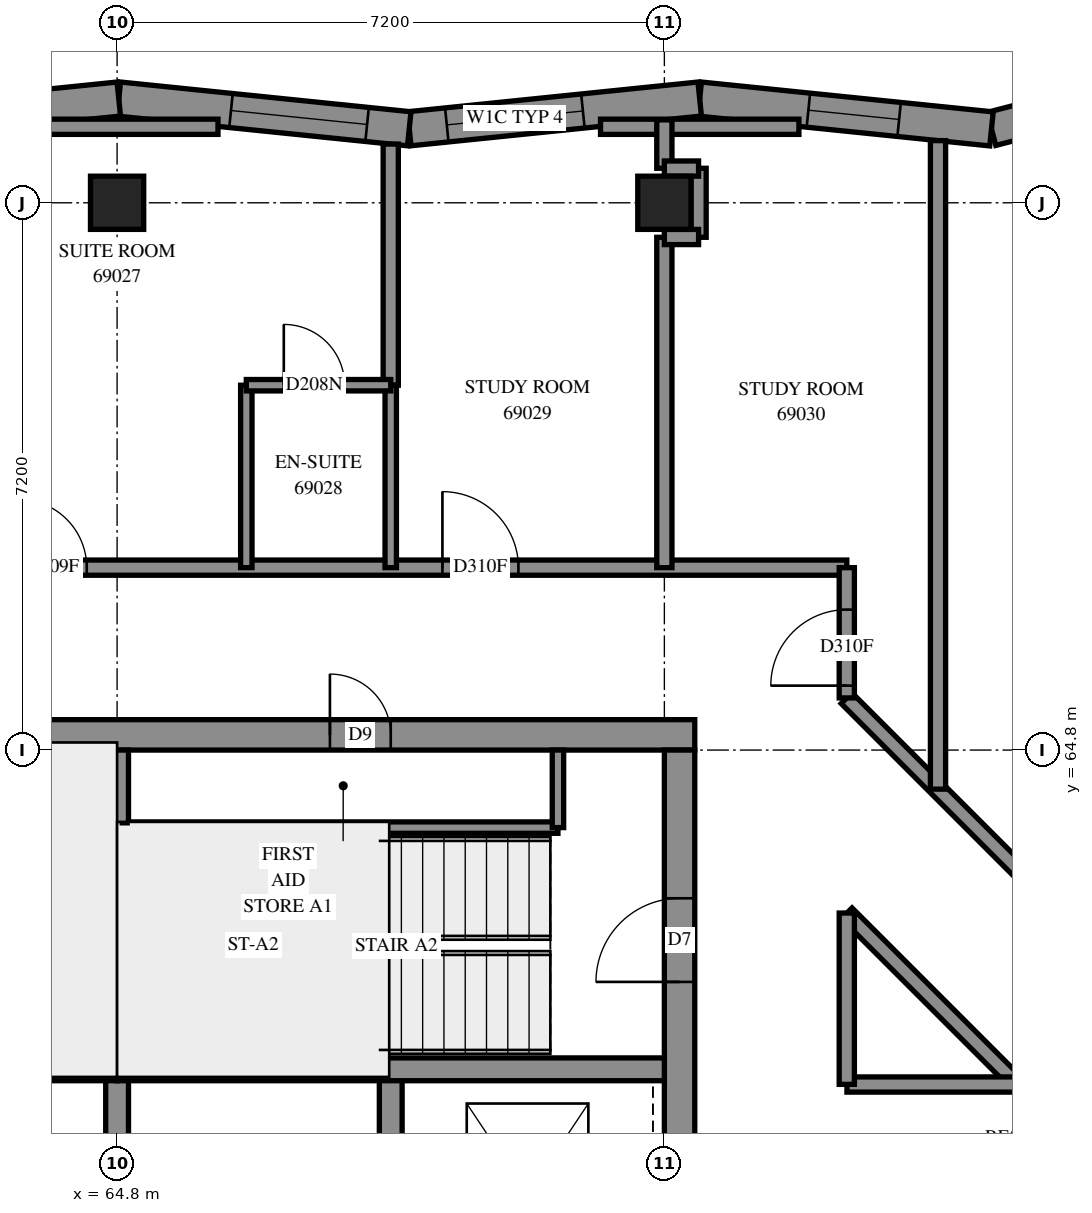
"""IFC4 building model, lengths in metres.
Left out: names, types, materials, properties, quantities, classifications, styles, units other than length and angle.
Written with IfcOpenShell. Run it as: python <this file> out.ifc"""

import sys

from ifc_helpers import new_model, si_unit, direction, frame, frame_2d, origin, origin_2d, place, context, subcontext, project, spatial, polyline, rectangle, outline, extrude, element, fill, save


model = new_model("IFC4")
c1 = context("Model", 3, precision=1e-05, world=origin(), true_north=direction((0.0, 1.0)))
c2 = subcontext(c1, "Body", "Model", "MODEL_VIEW")
j1 = project(units=[si_unit("LENGTHUNIT", "METRE"), si_unit("PLANEANGLEUNIT", "RADIAN")], contexts=[c1])
p1 = place(None, origin())
s1 = spatial("IfcSite", under=j1, at=p1, CompositionType="ELEMENT")
p2 = place(p1, origin())
s2 = spatial("IfcBuilding", under=s1, at=p2, CompositionType="ELEMENT")
p3 = place(p2, frame((0.0, 0.0, 254.0)))
s3 = spatial("IfcBuildingStorey", under=s2, at=p3, CompositionType="ELEMENT", Elevation=254.0)
for number, where, z_axis, x_axis in (
    (1, (64.8, 72.0, 0.0), (0.0, 0.0, 1.0), (1.0, 0.0, 0.0)),
    (2, (72.0, 72.0, 0.0), (0.0, 0.0, 1.0), (1.0, 0.0, 0.0)),
):
    element("IfcColumn", number, at=place(p3, frame(where, z_axis=z_axis, x_axis=x_axis)), inside=s3, PredefinedType="COLUMN", context=c2, shape_type="SweptSolid", body=[
        extrude(rectangle(XDim=0.7, YDim=0.7, at=origin_2d()), origin(), (0.0, 0.0, 1.0), 3.1),
    ])
p4 = place(p3, frame((57.2, 65.0, -0.3), z_axis=(0.0, 0.0, 1.0), x_axis=(1.0, 0.0, 0.0)))
e3 = element("IfcWall", 3, at=p4, inside=s3, PredefinedType="SHEAR", context=c2, shape_type="SweptSolid", body=[
    extrude(rectangle(XDim=15.2, YDim=0.4, at=frame_2d((7.6, 0.0))), origin(), (0.0, 0.0, 1.0), 2.7),
])
p5 = place(p4, frame((10.4, 0.0, 0.3)))
e4 = element("IfcOpeningElement", 4, at=p5, cuts=e3, PredefinedType="OPENING", context=c2, shape_type="SweptSolid", body=[
    extrude(rectangle(XDim=0.8, YDim=2.1, at=frame_2d((0.4, 1.05))), frame((0.0, 0.21, 0.0), z_axis=(0.0, -1.0, 0.0), x_axis=(1.0, 0.0, 0.0)), (0.0, 0.0, 1.0), 0.42),
])
p6 = place(p3, frame((72.2, 50.4, -0.3), z_axis=(0.0, 0.0, 1.0), x_axis=(0.0, 1.0, 0.0)))
e5 = element("IfcWall", 5, at=p6, inside=s3, PredefinedType="SHEAR", context=c2, shape_type="SweptSolid", body=[
    extrude(rectangle(XDim=14.4, YDim=0.4, at=frame_2d((7.2, 0.0))), origin(), (0.0, 0.0, 1.0), 2.7),
])
p7 = place(p6, frame((4.55, 0.0, 0.3)))
e6 = element("IfcOpeningElement", 6, at=p7, cuts=e5, PredefinedType="OPENING", context=c2, shape_type="SweptSolid", body=[
    extrude(rectangle(XDim=1.1, YDim=2.1, at=frame_2d((0.55, 1.05))), frame((0.0, 0.21, 0.0), z_axis=(0.0, -1.0, 0.0), x_axis=(1.0, 0.0, 0.0)), (0.0, 0.0, 1.0), 0.42),
])
p8 = place(p6, frame((11.35, 0.0, 0.3)))
e7 = element("IfcOpeningElement", 7, at=p8, cuts=e5, PredefinedType="OPENING", context=c2, shape_type="SweptSolid", body=[
    extrude(rectangle(XDim=1.1, YDim=2.1, at=frame_2d((0.55, 1.05))), frame((0.0, 0.21, 0.0), z_axis=(0.0, -1.0, 0.0), x_axis=(1.0, 0.0, 0.0)), (0.0, 0.0, 1.0), 0.42),
])
for number, where, z_axis, x_axis in (
    (8, (64.8, 57.3, 0.0), (0.0, 0.0, 1.0), (0.0, 1.0, 0.0)),
    (9, (68.4, 57.3, 0.0), (0.0, 0.0, 1.0), (0.0, 1.0, 0.0)),
):
    element("IfcWall", number, at=place(p3, frame(where, z_axis=z_axis, x_axis=x_axis)), inside=s3, PredefinedType="SOLIDWALL", context=c2, shape_type="SweptSolid", body=[
        extrude(rectangle(XDim=3.3, YDim=0.3, at=frame_2d((1.65, 0.0))), origin(), (0.0, 0.0, 1.0), 3.1),
    ])
for number, where, z_axis, x_axis in (
    (10, (57.6, 60.6, 0.0), (0.0, 0.0, 1.0), (1.0, 0.0, 0.0)),
    (11, (64.8, 60.6, 0.0), (0.0, 0.0, 1.0), (1.0, 0.0, 0.0)),
):
    element("IfcWall", number, at=place(p3, frame(where, z_axis=z_axis, x_axis=x_axis)), inside=s3, PredefinedType="SOLIDWALL", context=c2, shape_type="SweptSolid", body=[
        extrude(rectangle(XDim=7.2, YDim=0.3, at=frame_2d((3.6, 0.0))), origin(), (0.0, 0.0, 1.0), 3.1),
    ])
p9 = place(p3, frame((64.8, 60.6, 0.0), z_axis=(0.0, 0.0, 1.0), x_axis=(0.0, 1.0, 0.0)))
e12 = element("IfcWall", 12, at=p9, inside=s3, PredefinedType="SOLIDWALL", context=c2, shape_type="SweptSolid", body=[
    extrude(rectangle(XDim=4.2, YDim=0.3, at=frame_2d((2.1, 0.0))), origin(), (0.0, 0.0, 1.0), 3.1),
])
p10 = place(p3, frame((79.994, 73.929, 0.0), z_axis=(0.0, 0.0, 1.0), x_axis=(-0.9679820268, -0.2510195126, 0.0)))
e13 = element("IfcWall", 13, at=p10, inside=s3, PredefinedType="SOLIDWALL", context=c2, shape_type="SweptSolid", body=[
    extrude(outline(polyline([(-0.176, -0.225), (3.772, -0.225), (3.853, 0.225), (0.176, 0.225), (-0.176, -0.225)])), origin(), (0.0, 0.0, 1.0), 3.1),
])
p11 = place(p10, frame((1.466, 0.0, 0.45)))
e14 = element("IfcOpeningElement", 14, at=p11, cuts=e13, PredefinedType="OPENING", context=c2, shape_type="SweptSolid", body=[
    extrude(rectangle(XDim=1.2, YDim=2.55, at=frame_2d((0.6, 1.275))), frame((0.0, 0.235, 0.0), z_axis=(0.0, -1.0, 0.0), x_axis=(1.0, 0.0, 0.0)), (0.0, 0.0, 1.0), 0.47),
])
p12 = place(p3, frame((76.304, 72.972, 0.0), z_axis=(0.0, 0.0, 1.0), x_axis=(-0.994808045, 0.1017691196, 0.0)))
e15 = element("IfcWall", 15, at=p12, inside=s3, PredefinedType="SOLIDWALL", context=c2, shape_type="SweptSolid", body=[
    extrude(outline(polyline([(0.04, -0.225), (3.882, -0.225), (3.836, 0.225), (-0.04, 0.225), (0.04, -0.225)])), origin(), (0.0, 0.0, 1.0), 3.1),
])
p13 = place(p12, frame((1.222, 0.0, 0.45)))
e16 = element("IfcOpeningElement", 16, at=p13, cuts=e15, PredefinedType="OPENING", context=c2, shape_type="SweptSolid", body=[
    extrude(rectangle(XDim=1.2, YDim=2.55, at=frame_2d((0.6, 1.275))), frame((0.0, 0.235, 0.0), z_axis=(0.0, -1.0, 0.0), x_axis=(1.0, 0.0, 0.0)), (0.0, 0.0, 1.0), 0.47),
])
p14 = place(p3, frame((72.465, 73.365, 0.0), z_axis=(0.0, 0.0, 1.0), x_axis=(-0.9948059356, -0.1017897367, 0.0)))
e17 = element("IfcWall", 17, at=p14, inside=s3, PredefinedType="SOLIDWALL", context=c2, shape_type="SweptSolid", body=[
    extrude(outline(polyline([(-0.023, -0.225), (3.818, -0.225), (3.864, 0.225), (0.023, 0.225), (-0.023, -0.225)])), origin(), (0.0, 0.0, 1.0), 3.1),
])
p15 = place(p14, frame((1.545, 0.0, 0.7)))
e18 = element("IfcOpeningElement", 18, at=p15, cuts=e17, PredefinedType="OPENING", context=c2, shape_type="SweptSolid", body=[
    extrude(rectangle(XDim=1.8, YDim=2.3, at=frame_2d((0.9, 1.15))), frame((0.0, 0.235, 0.0), z_axis=(0.0, -1.0, 0.0), x_axis=(1.0, 0.0, 0.0)), (0.0, 0.0, 1.0), 0.47),
])
p16 = place(p3, frame((68.644, 72.974, 0.0), z_axis=(0.0, 0.0, 1.0), x_axis=(-0.9948059356, 0.1017897367, 0.0)))
e19 = element("IfcWall", 19, at=p16, inside=s3, PredefinedType="SOLIDWALL", context=c2, shape_type="SweptSolid", body=[
    extrude(outline(polyline([(0.023, -0.225), (3.864, -0.225), (3.818, 0.225), (-0.023, 0.225), (0.023, -0.225)])), origin(), (0.0, 0.0, 1.0), 3.1),
])
p17 = place(p16, frame((0.557, 0.0, 0.7)))
e20 = element("IfcOpeningElement", 20, at=p17, cuts=e19, PredefinedType="OPENING", context=c2, shape_type="SweptSolid", body=[
    extrude(rectangle(XDim=1.8, YDim=2.3, at=frame_2d((0.9, 1.15))), frame((0.0, 0.235, 0.0), z_axis=(0.0, -1.0, 0.0), x_axis=(1.0, 0.0, 0.0)), (0.0, 0.0, 1.0), 0.47),
])
p18 = place(p3, frame((64.822, 73.365, 0.0), z_axis=(0.0, 0.0, 1.0), x_axis=(-0.9948062053, -0.1017871006, 0.0)))
e21 = element("IfcWall", 21, at=p18, inside=s3, PredefinedType="SOLIDWALL", context=c2, shape_type="SweptSolid", body=[
    extrude(outline(polyline([(-0.023, -0.225), (3.818, -0.225), (3.864, 0.225), (0.023, 0.225), (-0.023, -0.225)])), origin(), (0.0, 0.0, 1.0), 3.1),
])
p19 = place(p18, frame((1.484, 0.0, 0.7)))
e22 = element("IfcOpeningElement", 22, at=p19, cuts=e21, PredefinedType="OPENING", context=c2, shape_type="SweptSolid", body=[
    extrude(rectangle(XDim=1.8, YDim=2.3, at=frame_2d((0.9, 1.15))), frame((0.0, 0.235, 0.0), z_axis=(0.0, -1.0, 0.0), x_axis=(1.0, 0.0, 0.0)), (0.0, 0.0, 1.0), 0.47),
])
p20 = place(p3, frame((64.95, 63.78, 0.0), z_axis=(0.0, 0.0, 1.0), x_axis=(1.0, 0.0, 0.0)))
e23 = element("IfcWall", 23, at=p20, inside=s3, PredefinedType="PARTITIONING", context=c2, shape_type="SweptSolid", body=[
    extrude(rectangle(XDim=5.65, YDim=0.15, at=frame_2d((2.825, 0.0))), origin(), (0.0, 0.0, 1.0), 3.1),
])
p21 = place(p3, frame((70.6, 63.78, 0.0), z_axis=(0.0, 0.0, 1.0), x_axis=(0.0, 1.0, 0.0)))
e24 = element("IfcWall", 24, at=p21, inside=s3, PredefinedType="PARTITIONING", context=c2, shape_type="SweptSolid", body=[
    extrude(rectangle(XDim=1.02, YDim=0.15, at=frame_2d((0.51, 0.0))), origin(), (0.0, 0.0, 1.0), 3.1),
])
p22 = place(p3, frame((55.2, 67.2, 0.0), z_axis=(0.0, 0.0, 1.0), x_axis=(1.0, 0.0, 0.0)))
e25 = element("IfcWall", 25, at=p22, inside=s3, PredefinedType="PARTITIONING", context=c2, shape_type="SweptSolid", body=[
    extrude(rectangle(XDim=19.2, YDim=0.2, at=frame_2d((9.6, 0.0))), origin(), (0.0, 0.0, 1.0), 3.1),
])
p23 = place(p22, frame((4.475, 0.0, 0.0)))
e26 = element("IfcOpeningElement", 26, at=p23, cuts=e25, PredefinedType="OPENING", context=c2, shape_type="SweptSolid", body=[
    extrude(rectangle(XDim=1.0, YDim=2.1, at=frame_2d((0.5, 1.05))), frame((0.0, 0.11, 0.0), z_axis=(0.0, -1.0, 0.0), x_axis=(1.0, 0.0, 0.0)), (0.0, 0.0, 1.0), 0.22),
])
p24 = place(p22, frame((8.301, 0.0, 0.0)))
e27 = element("IfcOpeningElement", 27, at=p24, cuts=e25, PredefinedType="OPENING", context=c2, shape_type="SweptSolid", body=[
    extrude(rectangle(XDim=0.9, YDim=2.1, at=frame_2d((0.45, 1.05))), frame((0.0, 0.11, 0.0), z_axis=(0.0, -1.0, 0.0), x_axis=(1.0, 0.0, 0.0)), (0.0, 0.0, 1.0), 0.22),
])
p25 = place(p22, frame((13.88, 0.0, 0.0)))
e28 = element("IfcOpeningElement", 28, at=p25, cuts=e25, PredefinedType="OPENING", context=c2, shape_type="SweptSolid", body=[
    extrude(rectangle(XDim=1.0, YDim=2.1, at=frame_2d((0.5, 1.05))), frame((0.0, 0.11, 0.0), z_axis=(0.0, -1.0, 0.0), x_axis=(1.0, 0.0, 0.0)), (0.0, 0.0, 1.0), 0.22),
])
p26 = place(p3, frame((74.397, 65.483, 0.0), z_axis=(0.0, 0.0, 1.0), x_axis=(0.7071067812, -0.7071067812, 0.0)))
e29 = element("IfcWall", 29, at=p26, inside=s3, PredefinedType="PARTITIONING", context=c2, shape_type="SweptSolid", body=[
    extrude(rectangle(XDim=10.788, YDim=0.2, at=frame_2d((5.394, 0.0))), origin(), (0.0, 0.0, 1.0), 3.1),
])
p27 = place(p26, frame((5.083, 0.0, 0.0)))
e30 = element("IfcOpeningElement", 30, at=p27, cuts=e29, PredefinedType="OPENING", context=c2, shape_type="SweptSolid", body=[
    extrude(rectangle(XDim=1.0, YDim=2.1, at=frame_2d((0.5, 1.05))), frame((0.0, 0.11, 0.0), z_axis=(0.0, -1.0, 0.0), x_axis=(1.0, 0.0, 0.0)), (0.0, 0.0, 1.0), 0.22),
])
p28 = place(p26, frame((7.858, 0.0, 0.0)))
e31 = element("IfcOpeningElement", 31, at=p28, cuts=e29, PredefinedType="OPENING", context=c2, shape_type="SweptSolid", body=[
    extrude(rectangle(XDim=1.0, YDim=2.1, at=frame_2d((0.5, 1.05))), frame((0.0, 0.11, 0.0), z_axis=(0.0, -1.0, 0.0), x_axis=(1.0, 0.0, 0.0)), (0.0, 0.0, 1.0), 0.22),
])
p29 = place(p3, frame((75.6, 64.286, 0.0), z_axis=(0.0, 0.0, 1.0), x_axis=(0.0, 1.0, 0.0)))
e32 = element("IfcWall", 32, at=p29, inside=s3, PredefinedType="PARTITIONING", context=c2, shape_type="SweptSolid", body=[
    extrude(rectangle(XDim=8.532, YDim=0.2, at=frame_2d((4.266, 0.0))), origin(), (0.0, 0.0, 1.0), 3.1),
])
p30 = place(p3, frame((72.0, 67.2, 0.0), z_axis=(0.0, 0.0, 1.0), x_axis=(0.0, 1.0, 0.0)))
e33 = element("IfcWall", 33, at=p30, inside=s3, PredefinedType="PARTITIONING", context=c2, shape_type="SweptSolid", body=[
    extrude(rectangle(XDim=4.346, YDim=0.2, at=frame_2d((2.173, 0.0))), origin(), (0.0, 0.0, 1.0), 3.1),
])
p31 = place(p3, frame((74.399, 62.653, 0.0), z_axis=(0.0, 0.0, 1.0), x_axis=(0.7071067812, -0.7071067812, 0.0)))
e34 = element("IfcWall", 34, at=p31, inside=s3, PredefinedType="PARTITIONING", context=c2, shape_type="SweptSolid", body=[
    extrude(rectangle(XDim=3.188, YDim=0.2, at=frame_2d((1.594, 0.0))), origin(), (0.0, 0.0, 1.0), 3.1),
])
p32 = place(p3, frame((68.4, 69.6, 0.0), z_axis=(0.0, 0.0, 1.0), x_axis=(0.0, 1.0, 0.0)))
e35 = element("IfcWall", 35, at=p32, inside=s3, PredefinedType="PARTITIONING", context=c2, shape_type="SweptSolid", body=[
    extrude(rectangle(XDim=3.173, YDim=0.2, at=frame_2d((1.586, 0.0))), origin(), (0.0, 0.0, 1.0), 3.1),
])
for number, where, z_axis, x_axis in (
    (36, (71.16, 73.0, 0.0), (0.0, 0.0, 1.0), (1.0, 0.0, 0.0)),
    (37, (63.517, 73.0, 0.0), (0.0, 0.0, 1.0), (1.0, 0.0, 0.0)),
):
    element("IfcWall", number, at=place(p3, frame(where, z_axis=z_axis, x_axis=x_axis)), inside=s3, PredefinedType="PARTITIONING", context=c2, shape_type="SweptSolid", body=[
        extrude(rectangle(XDim=2.61, YDim=0.2, at=frame_2d((1.305, 0.0))), origin(), (0.0, 0.0, 1.0), 3.1),
    ])
for number, where, z_axis, x_axis in (
    (38, (66.5, 67.2, 0.0), (0.0, 0.0, 1.0), (0.0, 1.0, 0.0)),
    (39, (68.4, 67.2, 0.0), (0.0, 0.0, 1.0), (0.0, 1.0, 0.0)),
):
    element("IfcWall", number, at=place(p3, frame(where, z_axis=z_axis, x_axis=x_axis)), inside=s3, PredefinedType="PARTITIONING", context=c2, shape_type="SweptSolid", body=[
        extrude(rectangle(XDim=2.4, YDim=0.15, at=frame_2d((1.2, 0.0))), origin(), (0.0, 0.0, 1.0), 3.1),
    ])
for number, where, z_axis, x_axis in (
    (40, (74.402, 60.4, 0.0), (0.0, 0.0, 1.0), (1.0, 0.0, 0.0)),
    (41, (74.4, 60.402, 0.0), (0.0, 0.0, 1.0), (0.0, 1.0, 0.0)),
):
    element("IfcWall", number, at=place(p3, frame(where, z_axis=z_axis, x_axis=x_axis)), inside=s3, PredefinedType="PARTITIONING", context=c2, shape_type="SweptSolid", body=[
        extrude(rectangle(XDim=2.254, YDim=0.2, at=frame_2d((1.127, 0.0))), origin(), (0.0, 0.0, 1.0), 3.1),
    ])
p33 = place(p3, frame((66.5, 69.6, 0.0), z_axis=(0.0, 0.0, 1.0), x_axis=(1.0, 0.0, 0.0)))
e42 = element("IfcWall", 42, at=p33, inside=s3, PredefinedType="PARTITIONING", context=c2, shape_type="SweptSolid", body=[
    extrude(rectangle(XDim=1.9, YDim=0.15, at=frame_2d((0.95, 0.0))), origin(), (0.0, 0.0, 1.0), 3.1),
])
p34 = place(p33, frame((0.493, 0.0, 0.0)))
e43 = element("IfcOpeningElement", 43, at=p34, cuts=e42, PredefinedType="OPENING", context=c2, shape_type="SweptSolid", body=[
    extrude(rectangle(XDim=0.8, YDim=2.1, at=frame_2d((0.4, 1.05))), frame((0.0, 0.085, 0.0), z_axis=(0.0, -1.0, 0.0), x_axis=(1.0, 0.0, 0.0)), (0.0, 0.0, 1.0), 0.17),
])
p35 = place(p3, frame((74.4, 65.486, 0.0), z_axis=(0.0, 0.0, 1.0), x_axis=(0.0, 1.0, 0.0)))
e44 = element("IfcWall", 44, at=p35, inside=s3, PredefinedType="PARTITIONING", context=c2, shape_type="SweptSolid", body=[
    extrude(rectangle(XDim=1.714, YDim=0.2, at=frame_2d((0.857, 0.0))), origin(), (0.0, 0.0, 1.0), 3.1),
])
p36 = place(p35, frame((0.162, 0.0, 0.0)))
e45 = element("IfcOpeningElement", 45, at=p36, cuts=e44, PredefinedType="OPENING", context=c2, shape_type="SweptSolid", body=[
    extrude(rectangle(XDim=1.0, YDim=2.1, at=frame_2d((0.5, 1.05))), frame((0.0, 0.11, 0.0), z_axis=(0.0, -1.0, 0.0), x_axis=(1.0, 0.0, 0.0)), (0.0, 0.0, 1.0), 0.22),
])
p37 = place(p3, frame((72.45, 71.546, 0.0), z_axis=(0.0, 0.0, 1.0), x_axis=(0.0, 1.0, 0.0)))
e46 = element("IfcWall", 46, at=p37, inside=s3, PredefinedType="PARTITIONING", context=c2, shape_type="SweptSolid", body=[
    extrude(rectangle(XDim=0.908, YDim=0.2, at=frame_2d((0.454, 0.0))), origin(), (0.0, 0.0, 1.0), 3.1),
])
p38 = place(p3, frame((72.0, 72.454, 0.0), z_axis=(0.0, 0.0, 1.0), x_axis=(0.0, 1.0, 0.0)))
e47 = element("IfcWall", 47, at=p38, inside=s3, PredefinedType="PARTITIONING", context=c2, shape_type="SweptSolid", body=[
    extrude(rectangle(XDim=0.637, YDim=0.2, at=frame_2d((0.319, 0.0))), origin(), (0.0, 0.0, 1.0), 3.1),
])
for number, where, z_axis, x_axis in (
    (48, (72.0, 72.45, 0.0), (0.0, 0.0, 1.0), (1.0, 0.0, 0.0)),
    (49, (72.0, 71.55, 0.0), (0.0, 0.0, 1.0), (1.0, 0.0, 0.0)),
):
    element("IfcWall", number, at=place(p3, frame(where, z_axis=z_axis, x_axis=x_axis)), inside=s3, PredefinedType="PARTITIONING", context=c2, shape_type="SweptSolid", body=[
        extrude(rectangle(XDim=0.45, YDim=0.2, at=frame_2d((0.225, 0.0))), origin(), (0.0, 0.0, 1.0), 3.1),
    ])
p39 = place(p13, origin())
e50 = element("IfcWindow", 50, at=p39, inside=s3, PartitioningType="SINGLE_PANEL", PredefinedType="WINDOW", context=c2, shape_type="SweptSolid", body=[
    extrude(rectangle(XDim=1.2, YDim=2.55, at=frame_2d((0.6, 1.275))), frame((0.0, 0.205, 0.0), z_axis=(0.0, -1.0, 0.0), x_axis=(1.0, 0.0, 0.0)), (0.0, 0.0, 1.0), 0.06),
])
fill(e16, e50)
p40 = place(p5, origin())
e51 = element("IfcDoor", 51, at=p40, inside=s3, OperationType="SINGLE_SWING_RIGHT", PredefinedType="DOOR", context=c2, shape_type="SweptSolid", body=[
    extrude(rectangle(XDim=0.8, YDim=2.1, at=frame_2d((0.4, 1.05))), frame((0.0, 0.025, 0.0), z_axis=(0.0, -1.0, 0.0), x_axis=(1.0, 0.0, 0.0)), (0.0, 0.0, 1.0), 0.05),
])
fill(e4, e51)
p41 = place(p8, origin())
e52 = element("IfcDoor", 52, at=p41, inside=s3, OperationType="SINGLE_SWING_RIGHT", PredefinedType="DOOR", context=c2, shape_type="SweptSolid", body=[
    extrude(rectangle(XDim=1.1, YDim=2.1, at=frame_2d((0.55, 1.05))), frame((0.0, 0.025, 0.0), z_axis=(0.0, -1.0, 0.0), x_axis=(1.0, 0.0, 0.0)), (0.0, 0.0, 1.0), 0.05),
])
fill(e7, e52)
p42 = place(p24, origin())
e53 = element("IfcDoor", 53, at=p42, inside=s3, OperationType="SINGLE_SWING_LEFT", PredefinedType="DOOR", context=c2, shape_type="SweptSolid", body=[
    extrude(rectangle(XDim=0.9, YDim=2.1, at=frame_2d((0.45, 1.05))), frame((0.0, 0.025, 0.0), z_axis=(0.0, -1.0, 0.0), x_axis=(1.0, 0.0, 0.0)), (0.0, 0.0, 1.0), 0.05),
])
fill(e27, e53)
p43 = place(p34, origin())
e54 = element("IfcDoor", 54, at=p43, inside=s3, OperationType="SINGLE_SWING_RIGHT", PredefinedType="DOOR", context=c2, shape_type="SweptSolid", body=[
    extrude(rectangle(XDim=0.8, YDim=2.1, at=frame_2d((0.4, 1.05))), frame((0.0, 0.025, 0.0), z_axis=(0.0, -1.0, 0.0), x_axis=(1.0, 0.0, 0.0)), (0.0, 0.0, 1.0), 0.05),
])
fill(e43, e54)
p44 = place(p25, origin())
e55 = element("IfcDoor", 55, at=p44, inside=s3, OperationType="SINGLE_SWING_LEFT", PredefinedType="DOOR", context=c2, shape_type="SweptSolid", body=[
    extrude(rectangle(XDim=1.0, YDim=2.1, at=frame_2d((0.5, 1.05))), frame((0.0, 0.025, 0.0), z_axis=(0.0, -1.0, 0.0), x_axis=(1.0, 0.0, 0.0)), (0.0, 0.0, 1.0), 0.05),
])
fill(e28, e55)
p45 = place(p36, origin())
e56 = element("IfcDoor", 56, at=p45, inside=s3, OperationType="SINGLE_SWING_RIGHT", PredefinedType="DOOR", context=c2, shape_type="SweptSolid", body=[
    extrude(rectangle(XDim=1.0, YDim=2.1, at=frame_2d((0.5, 1.05))), frame((0.0, 0.025, 0.0), z_axis=(0.0, -1.0, 0.0), x_axis=(1.0, 0.0, 0.0)), (0.0, 0.0, 1.0), 0.05),
])
fill(e45, e56)
p46 = place(p15, origin())
e57 = element("IfcWindow", 57, at=p46, inside=s3, PartitioningType="SINGLE_PANEL", PredefinedType="WINDOW", context=c2, shape_type="SweptSolid", body=[
    extrude(rectangle(XDim=1.8, YDim=2.3, at=frame_2d((0.9, 1.15))), frame((0.0, 0.205, 0.0), z_axis=(0.0, -1.0, 0.0), x_axis=(1.0, 0.0, 0.0)), (0.0, 0.0, 1.0), 0.06),
])
fill(e18, e57)
p47 = place(p17, origin())
e58 = element("IfcWindow", 58, at=p47, inside=s3, PartitioningType="SINGLE_PANEL", PredefinedType="WINDOW", context=c2, shape_type="SweptSolid", body=[
    extrude(rectangle(XDim=1.8, YDim=2.3, at=frame_2d((0.9, 1.15))), frame((0.0, 0.205, 0.0), z_axis=(0.0, -1.0, 0.0), x_axis=(1.0, 0.0, 0.0)), (0.0, 0.0, 1.0), 0.06),
])
fill(e20, e58)
save(model, sys.argv[1])
